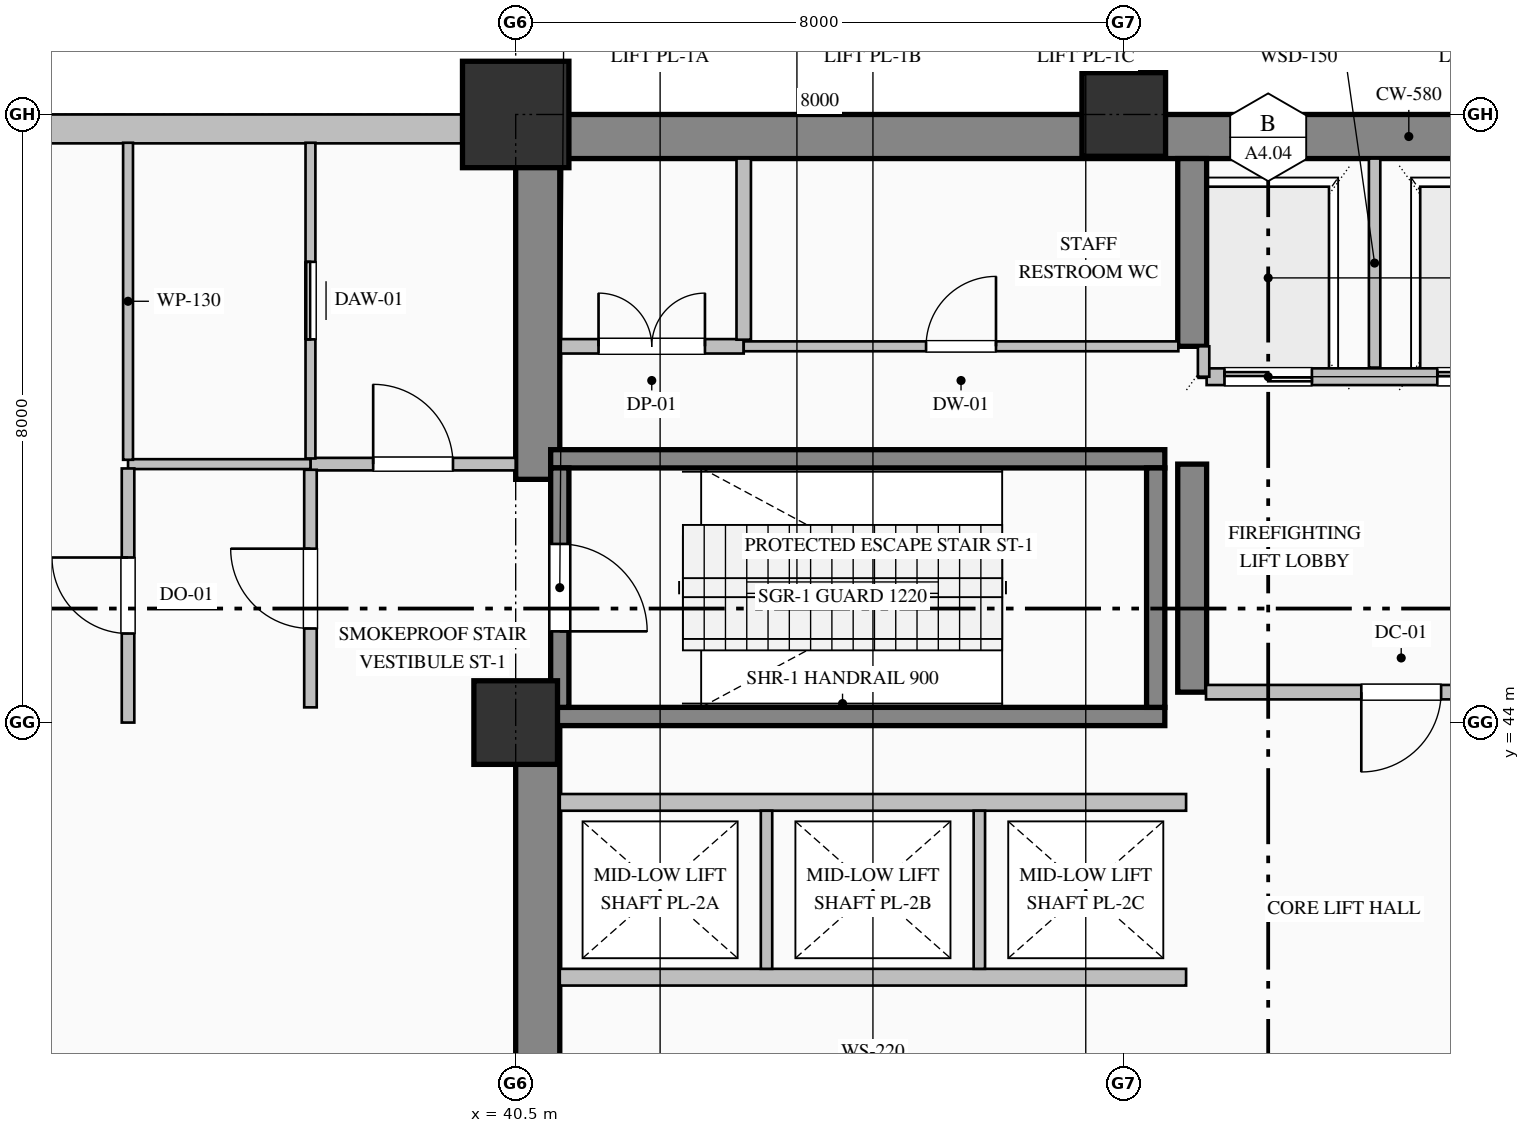
"""IFC4 building model, lengths in metres.
Left out: names, types, materials, properties, quantities, classifications, styles, units other than length and angle.
Written with IfcOpenShell. Run it as: python <this file> out.ifc"""

import sys

from ifc_helpers import new_model, si_unit, direction, frame, frame_2d, origin, origin_2d, place, context, subcontext, project, spatial, rectangle, hollow_rectangle, extrude, element, fill, save


model = new_model("IFC4")
c1 = context("Model", 3, precision=1e-05, world=origin(), true_north=direction((0.0, 1.0)))
c2 = subcontext(c1, "Body", "Model", "MODEL_VIEW")
j1 = project(units=[si_unit("LENGTHUNIT", "METRE"), si_unit("PLANEANGLEUNIT", "RADIAN")], contexts=[c1])
p1 = place(None, origin())
s1 = spatial("IfcSite", under=j1, at=p1, CompositionType="ELEMENT")
p2 = place(p1, origin())
s2 = spatial("IfcBuilding", under=s1, at=p2, CompositionType="ELEMENT")
p3 = place(p2, frame((0.0, 0.0, 11.4)))
s3 = spatial("IfcBuildingStorey", under=s2, at=p3, CompositionType="ELEMENT", Elevation=11.4)
p4 = place(p3, frame((40.5, 51.71, 0.0), z_axis=(0.0, 0.0, 1.0), x_axis=(1.0, 0.0, 0.0)))
e1 = element("IfcWall", 1, at=p4, inside=s3, PredefinedType="SHEAR", context=c2, shape_type="SweptSolid", body=[
    extrude(rectangle(XDim=23.5, YDim=0.58, at=frame_2d((11.75, 0.0))), origin(), (0.0, 0.0, 1.0), 5.55),
])
p5 = place(p3, frame((40.79, 36.58, 0.0), z_axis=(0.0, 0.0, 1.0), x_axis=(0.0, 1.0, 0.0)))
e2 = element("IfcWall", 2, at=p5, inside=s3, PredefinedType="SHEAR", context=c2, shape_type="SweptSolid", body=[
    extrude(rectangle(XDim=7.82, YDim=0.58, at=frame_2d((3.91, 0.0))), origin(), (0.0, 0.0, 1.0), 5.55),
])
p6 = place(p3, frame((40.79, 47.2, 0.0), z_axis=(0.0, 0.0, 1.0), x_axis=(0.0, 1.0, 0.0)))
e3 = element("IfcWall", 3, at=p6, inside=s3, PredefinedType="SHEAR", context=c2, shape_type="SweptSolid", body=[
    extrude(rectangle(XDim=4.22, YDim=0.58, at=frame_2d((2.11, 0.0))), origin(), (0.0, 0.0, 1.0), 5.55),
])
p7 = place(p3, frame((49.4, 44.4, 0.0), z_axis=(0.0, 0.0, 1.0), x_axis=(0.0, 1.0, 0.0)))
e4 = element("IfcWall", 4, at=p7, inside=s3, PredefinedType="SHEAR", context=c2, shape_type="SweptSolid", body=[
    extrude(rectangle(XDim=3.0, YDim=0.38, at=frame_2d((1.5, 0.0))), origin(), (0.0, 0.0, 1.0), 5.55),
])
p8 = place(p3, frame((49.4, 48.95, 0.0), z_axis=(0.0, 0.0, 1.0), x_axis=(0.0, 1.0, 0.0)))
e5 = element("IfcWall", 5, at=p8, inside=s3, PredefinedType="SHEAR", context=c2, shape_type="SweptSolid", body=[
    extrude(rectangle(XDim=2.47, YDim=0.38, at=frame_2d((1.235, 0.0))), origin(), (0.0, 0.0, 1.0), 5.55),
])
p9 = place(p3, frame((40.5, 44.0, 0.0), z_axis=(0.0, 0.0, 1.0), x_axis=(1.0, 0.0, 0.0)))
e6 = element("IfcColumn", 6, at=p9, inside=s3, PredefinedType="COLUMN", context=c2, shape_type="SweptSolid", body=[
    extrude(rectangle(XDim=1.1, YDim=1.1, at=origin_2d()), origin(), (0.0, 0.0, 1.0), 6.0),
])
p10 = place(p3, frame((40.5, 52.0, 0.0), z_axis=(0.0, 0.0, 1.0), x_axis=(1.0, 0.0, 0.0)))
e7 = element("IfcColumn", 7, at=p10, inside=s3, PredefinedType="COLUMN", context=c2, shape_type="SweptSolid", body=[
    extrude(hollow_rectangle(XDim=1.4, YDim=1.4, WallThickness=0.05, at=origin_2d()), origin(), (0.0, 0.0, 1.0), 6.0),
])
p11 = place(p3, frame((48.5, 52.0, 0.0), z_axis=(0.0, 0.0, 1.0), x_axis=(1.0, 0.0, 0.0)))
e8 = element("IfcColumn", 8, at=p11, inside=s3, PredefinedType="COLUMN", context=c2, shape_type="SweptSolid", body=[
    extrude(hollow_rectangle(XDim=1.1, YDim=1.1, WallThickness=0.04, at=origin_2d()), origin(), (0.0, 0.0, 1.0), 6.0),
])
p12 = place(p3, frame((4.0, 51.81, 0.0), z_axis=(0.0, 0.0, 1.0), x_axis=(1.0, 0.0, 0.0)))
e9 = element("IfcWall", 9, at=p12, inside=s3, PredefinedType="SOLIDWALL", context=c2, shape_type="SweptSolid", body=[
    extrude(rectangle(XDim=36.52, YDim=0.38, at=frame_2d((18.26, 0.0))), origin(), (0.0, 0.0, 1.0), 5.05),
])
p13 = place(p12, frame((16.7, 0.0, 0.85)))
e10 = element("IfcOpeningElement", 10, at=p13, cuts=e9, PredefinedType="OPENING", context=c2, shape_type="SweptSolid", body=[
    extrude(rectangle(XDim=2.6, YDim=3.1, at=frame_2d((1.3, 1.55))), frame((0.0, 0.2, 0.0), z_axis=(0.0, -1.0, 0.0), x_axis=(1.0, 0.0, 0.0)), (0.0, 0.0, 1.0), 0.4),
])
p14 = place(p12, frame((24.1, 0.0, 0.9)))
e11 = element("IfcOpeningElement", 11, at=p14, cuts=e9, PredefinedType="OPENING", context=c2, shape_type="SweptSolid", body=[
    extrude(rectangle(XDim=2.2, YDim=2.65, at=frame_2d((1.1, 1.325))), frame((0.0, 0.2, 0.0), z_axis=(0.0, -1.0, 0.0), x_axis=(1.0, 0.0, 0.0)), (0.0, 0.0, 1.0), 0.4),
])
for number, where, z_axis, x_axis in (
    (12, (40.96, 47.47, 0.0), (0.0, 0.0, 1.0), (1.0, 0.0, 0.0)),
    (13, (49.04, 44.08, 0.0), (0.0, 0.0, 1.0), (-1.0, 0.0, 0.0)),
):
    element("IfcWall", number, at=place(p3, frame(where, z_axis=z_axis, x_axis=x_axis)), inside=s3, PredefinedType="SOLIDWALL", context=c2, shape_type="SweptSolid", body=[
        extrude(rectangle(XDim=8.08, YDim=0.24, at=frame_2d((4.04, 0.0))), origin(), (0.0, 0.0, 1.0), 6.0),
    ])
p15 = place(p3, frame((41.08, 47.35, 0.0), z_axis=(0.0, 0.0, 1.0), x_axis=(0.0, -1.0, 0.0)))
e14 = element("IfcWall", 14, at=p15, inside=s3, PredefinedType="SOLIDWALL", context=c2, shape_type="SweptSolid", body=[
    extrude(rectangle(XDim=3.15, YDim=0.24, at=frame_2d((1.575, 0.0))), origin(), (0.0, 0.0, 1.0), 6.0),
])
p16 = place(p15, frame((1.0, 0.0, 0.0)))
e15 = element("IfcOpeningElement", 15, at=p16, cuts=e14, PredefinedType="OPENING", context=c2, shape_type="SweptSolid", body=[
    extrude(rectangle(XDim=1.15, YDim=2.2, at=frame_2d((0.575, 1.1))), frame((0.0, 0.13, 0.0), z_axis=(0.0, -1.0, 0.0), x_axis=(1.0, 0.0, 0.0)), (0.0, 0.0, 1.0), 0.26),
])
p17 = place(p3, frame((48.92, 44.2, 0.0), z_axis=(0.0, 0.0, 1.0), x_axis=(0.0, 1.0, 0.0)))
e16 = element("IfcWall", 16, at=p17, inside=s3, PredefinedType="SOLIDWALL", context=c2, shape_type="SweptSolid", body=[
    extrude(rectangle(XDim=3.15, YDim=0.24, at=frame_2d((1.575, 0.0))), origin(), (0.0, 0.0, 1.0), 6.0),
])
p18 = place(p3, frame((54.71, 48.55, 0.0), z_axis=(0.0, 0.0, 1.0), x_axis=(-1.0, 0.0, 0.0)))
e17 = element("IfcWall", 17, at=p18, inside=s3, PredefinedType="PARTITIONING", context=c2, shape_type="SweptSolid", body=[
    extrude(rectangle(XDim=5.12, YDim=0.22, at=frame_2d((2.56, 0.0))), origin(), (0.0, 0.0, 1.0), 5.55),
])
p19 = place(p18, frame((3.735, 0.0, 0.0)))
e18 = element("IfcOpeningElement", 18, at=p19, cuts=e17, PredefinedType="OPENING", context=c2, shape_type="SweptSolid", body=[
    extrude(rectangle(XDim=1.15, YDim=2.2, at=frame_2d((0.575, 1.1))), frame((0.0, 0.12, 0.0), z_axis=(0.0, -1.0, 0.0), x_axis=(1.0, 0.0, 0.0)), (0.0, 0.0, 1.0), 0.24),
])
p20 = place(p18, frame((0.935, 0.0, 0.0)))
e19 = element("IfcOpeningElement", 19, at=p20, cuts=e17, PredefinedType="OPENING", context=c2, shape_type="SweptSolid", body=[
    extrude(rectangle(XDim=1.15, YDim=2.2, at=frame_2d((0.575, 1.1))), frame((0.0, 0.12, 0.0), z_axis=(0.0, -1.0, 0.0), x_axis=(1.0, 0.0, 0.0)), (0.0, 0.0, 1.0), 0.24),
])
p21 = place(p3, frame((51.8, 48.67, 0.0), z_axis=(0.0, 0.0, 1.0), x_axis=(0.0, 1.0, 0.0)))
e20 = element("IfcWall", 20, at=p21, inside=s3, PredefinedType="PARTITIONING", context=c2, shape_type="SweptSolid", body=[
    extrude(rectangle(XDim=2.75, YDim=0.15, at=frame_2d((1.375, 0.0))), origin(), (0.0, 0.0, 1.0), 5.55),
])
p22 = place(p3, frame((49.55, 48.55, 0.0), z_axis=(0.0, 0.0, 1.0), x_axis=(0.0, 1.0, 0.0)))
e21 = element("IfcWall", 21, at=p22, inside=s3, PredefinedType="PARTITIONING", context=c2, shape_type="SweptSolid", body=[
    extrude(rectangle(XDim=0.4, YDim=0.15, at=frame_2d((0.2, 0.0))), origin(), (0.0, 0.0, 1.0), 5.55),
])
for number, where, z_axis, x_axis in (
    (22, (49.32, 40.65, 0.0), (0.0, 0.0, 1.0), (-1.0, 0.0, 0.0)),
    (23, (41.08, 42.95, 0.0), (0.0, 0.0, 1.0), (1.0, 0.0, 0.0)),
):
    element("IfcWall", number, at=place(p3, frame(where, z_axis=z_axis, x_axis=x_axis)), inside=s3, PredefinedType="PARTITIONING", context=c2, shape_type="SweptSolid", body=[
        extrude(rectangle(XDim=8.24, YDim=0.22, at=frame_2d((4.12, 0.0))), origin(), (0.0, 0.0, 1.0), 5.55),
    ])
for number, where, z_axis, x_axis in (
    (24, (43.8, 40.76, 0.0), (0.0, 0.0, 1.0), (0.0, 1.0, 0.0)),
    (25, (46.6, 40.76, 0.0), (0.0, 0.0, 1.0), (0.0, 1.0, 0.0)),
):
    element("IfcWall", number, at=place(p3, frame(where, z_axis=z_axis, x_axis=x_axis)), inside=s3, PredefinedType="PARTITIONING", context=c2, shape_type="SweptSolid", body=[
        extrude(rectangle(XDim=2.08, YDim=0.15, at=frame_2d((1.04, 0.0))), origin(), (0.0, 0.0, 1.0), 5.55),
    ])
p23 = place(p3, frame((37.8, 47.4, 0.0), z_axis=(0.0, 0.0, 1.0), x_axis=(1.0, 0.0, 0.0)))
e26 = element("IfcWall", 26, at=p23, inside=s3, PredefinedType="PARTITIONING", context=c2, shape_type="SweptSolid", body=[
    extrude(rectangle(XDim=2.7, YDim=0.165, at=frame_2d((1.35, 0.0))), origin(), (0.0, 0.0, 1.0), 5.55),
])
p24 = place(p23, frame((0.825, 0.0, 0.0)))
e27 = element("IfcOpeningElement", 27, at=p24, cuts=e26, PredefinedType="OPENING", context=c2, shape_type="SweptSolid", body=[
    extrude(rectangle(XDim=1.05, YDim=2.15, at=frame_2d((0.525, 1.075))), frame((0.0, 0.093, 0.0), z_axis=(0.0, -1.0, 0.0), x_axis=(1.0, 0.0, 0.0)), (0.0, 0.0, 1.0), 0.185),
])
p25 = place(p3, frame((37.8, 44.2, 0.0), z_axis=(0.0, 0.0, 1.0), x_axis=(0.0, 1.0, 0.0)))
e28 = element("IfcWall", 28, at=p25, inside=s3, PredefinedType="PARTITIONING", context=c2, shape_type="SweptSolid", body=[
    extrude(rectangle(XDim=3.125, YDim=0.165, at=frame_2d((1.563, 0.0))), origin(), (0.0, 0.0, 1.0), 5.55),
])
p26 = place(p25, frame((1.038, 0.0, 0.0)))
e29 = element("IfcOpeningElement", 29, at=p26, cuts=e28, PredefinedType="OPENING", context=c2, shape_type="SweptSolid", body=[
    extrude(rectangle(XDim=1.05, YDim=2.15, at=frame_2d((0.525, 1.075))), frame((0.0, 0.093, 0.0), z_axis=(0.0, -1.0, 0.0), x_axis=(1.0, 0.0, 0.0)), (0.0, 0.0, 1.0), 0.185),
])
p27 = place(p3, frame((37.8, 47.475, 0.0), z_axis=(0.0, 0.0, 1.0), x_axis=(0.0, 1.0, 0.0)))
e30 = element("IfcWall", 30, at=p27, inside=s3, PredefinedType="PARTITIONING", context=c2, shape_type="SweptSolid", body=[
    extrude(rectangle(XDim=4.153, YDim=0.13, at=frame_2d((2.077, 0.0))), origin(), (0.0, 0.0, 1.0), 5.55),
])
p28 = place(p27, frame((1.567, 0.0, 0.0)))
e31 = element("IfcOpeningElement", 31, at=p28, cuts=e30, PredefinedType="OPENING", context=c2, shape_type="SweptSolid", body=[
    extrude(rectangle(XDim=1.02, YDim=2.15, at=frame_2d((0.51, 1.075))), frame((0.0, 0.075, 0.0), z_axis=(0.0, -1.0, 0.0), x_axis=(1.0, 0.0, 0.0)), (0.0, 0.0, 1.0), 0.15),
])
p29 = place(p3, frame((37.8, 47.4, 0.0), z_axis=(0.0, 0.0, 1.0), x_axis=(-1.0, 0.0, 0.0)))
e32 = element("IfcWall", 32, at=p29, inside=s3, PredefinedType="PARTITIONING", context=c2, shape_type="SweptSolid", body=[
    extrude(rectangle(XDim=2.4, YDim=0.13, at=frame_2d((1.2, 0.0))), origin(), (0.0, 0.0, 1.0), 5.55),
])
p30 = place(p3, frame((35.4, 47.457, 0.0), z_axis=(0.0, 0.0, 1.0), x_axis=(0.0, 1.0, 0.0)))
e33 = element("IfcWall", 33, at=p30, inside=s3, PredefinedType="PARTITIONING", context=c2, shape_type="SweptSolid", body=[
    extrude(rectangle(XDim=4.171, YDim=0.13, at=frame_2d((2.085, 0.0))), origin(), (0.0, 0.0, 1.0), 5.55),
])
p31 = place(p3, frame((41.08, 48.95, 0.0), z_axis=(0.0, 0.0, 1.0), x_axis=(1.0, 0.0, 0.0)))
e34 = element("IfcWall", 34, at=p31, inside=s3, PredefinedType="PARTITIONING", context=c2, shape_type="SweptSolid", body=[
    extrude(rectangle(XDim=2.42, YDim=0.19, at=frame_2d((1.21, 0.0))), origin(), (0.0, 0.0, 1.0), 5.55),
])
p32 = place(p31, frame((0.51, 0.0, 0.0)))
e35 = element("IfcOpeningElement", 35, at=p32, cuts=e34, PredefinedType="OPENING", context=c2, shape_type="SweptSolid", body=[
    extrude(rectangle(XDim=1.4, YDim=2.25, at=frame_2d((0.7, 1.125))), frame((0.0, 0.105, 0.0), z_axis=(0.0, -1.0, 0.0), x_axis=(1.0, 0.0, 0.0)), (0.0, 0.0, 1.0), 0.21),
])
p33 = place(p3, frame((43.5, 48.95, 0.0), z_axis=(0.0, 0.0, 1.0), x_axis=(1.0, 0.0, 0.0)))
e36 = element("IfcWall", 36, at=p33, inside=s3, PredefinedType="PARTITIONING", context=c2, shape_type="SweptSolid", body=[
    extrude(rectangle(XDim=5.718, YDim=0.13, at=frame_2d((2.859, 0.0))), origin(), (0.0, 0.0, 1.0), 5.55),
])
p34 = place(p33, frame((2.399, 0.0, 0.0)))
e37 = element("IfcOpeningElement", 37, at=p34, cuts=e36, PredefinedType="OPENING", context=c2, shape_type="SweptSolid", body=[
    extrude(rectangle(XDim=0.92, YDim=2.15, at=frame_2d((0.46, 1.075))), frame((0.0, 0.075, 0.0), z_axis=(0.0, -1.0, 0.0), x_axis=(1.0, 0.0, 0.0)), (0.0, 0.0, 1.0), 0.15),
])
p35 = place(p3, frame((54.718, 44.4, 0.0), z_axis=(0.0, 0.0, 1.0), x_axis=(-1.0, 0.0, 0.0)))
e38 = element("IfcWall", 38, at=p35, inside=s3, PredefinedType="PARTITIONING", context=c2, shape_type="SweptSolid", body=[
    extrude(rectangle(XDim=5.136, YDim=0.19, at=frame_2d((2.568, 0.0))), origin(), (0.0, 0.0, 1.0), 5.55),
])
p36 = place(p35, frame((2.043, 0.0, 0.0)))
e39 = element("IfcOpeningElement", 39, at=p36, cuts=e38, PredefinedType="OPENING", context=c2, shape_type="SweptSolid", body=[
    extrude(rectangle(XDim=1.05, YDim=2.15, at=frame_2d((0.525, 1.075))), frame((0.0, 0.105, 0.0), z_axis=(0.0, -1.0, 0.0), x_axis=(1.0, 0.0, 0.0)), (0.0, 0.0, 1.0), 0.21),
])
p37 = place(p3, frame((43.5, 51.42, 0.0), z_axis=(0.0, 0.0, 1.0), x_axis=(0.0, -1.0, 0.0)))
e40 = element("IfcWall", 40, at=p37, inside=s3, PredefinedType="PARTITIONING", context=c2, shape_type="SweptSolid", body=[
    extrude(rectangle(XDim=2.383, YDim=0.19, at=frame_2d((1.191, 0.0))), origin(), (0.0, 0.0, 1.0), 5.55),
])
p38 = place(p3, frame((35.4, 44.0, 0.0), z_axis=(0.0, 0.0, 1.0), x_axis=(0.0, 1.0, 0.0)))
e41 = element("IfcWall", 41, at=p38, inside=s3, PredefinedType="PARTITIONING", context=c2, shape_type="SweptSolid", body=[
    extrude(rectangle(XDim=3.343, YDim=0.165, at=frame_2d((1.671, 0.0))), origin(), (0.0, 0.0, 1.0), 5.55),
])
p39 = place(p38, frame((1.171, 0.0, 0.0)))
e42 = element("IfcOpeningElement", 42, at=p39, cuts=e41, PredefinedType="OPENING", context=c2, shape_type="SweptSolid", body=[
    extrude(rectangle(XDim=1.0, YDim=2.15, at=frame_2d((0.5, 1.075))), frame((0.0, 0.093, 0.0), z_axis=(0.0, -1.0, 0.0), x_axis=(1.0, 0.0, 0.0)), (0.0, 0.0, 1.0), 0.185),
])
p40 = place(p16, origin())
e43 = element("IfcDoor", 43, at=p40, inside=s3, OperationType="SINGLE_SWING_RIGHT", PredefinedType="DOOR", context=c2, shape_type="SweptSolid", body=[
    extrude(rectangle(XDim=1.15, YDim=2.2, at=frame_2d((0.575, 1.1))), frame((0.0, 0.025, 0.0), z_axis=(0.0, -1.0, 0.0), x_axis=(1.0, 0.0, 0.0)), (0.0, 0.0, 1.0), 0.05),
])
fill(e15, e43)
p41 = place(p19, origin())
e44 = element("IfcDoor", 44, at=p41, inside=s3, OperationType="DOUBLE_DOOR_SLIDING", PredefinedType="DOOR", context=c2, shape_type="SweptSolid", body=[
    extrude(rectangle(XDim=1.15, YDim=2.2, at=frame_2d((0.575, 1.1))), frame((0.0, 0.025, 0.0), z_axis=(0.0, -1.0, 0.0), x_axis=(1.0, 0.0, 0.0)), (0.0, 0.0, 1.0), 0.05),
])
fill(e18, e44)
p42 = place(p20, origin())
e45 = element("IfcDoor", 45, at=p42, inside=s3, OperationType="DOUBLE_DOOR_SLIDING", PredefinedType="DOOR", context=c2, shape_type="SweptSolid", body=[
    extrude(rectangle(XDim=1.15, YDim=2.2, at=frame_2d((0.575, 1.1))), frame((0.0, 0.025, 0.0), z_axis=(0.0, -1.0, 0.0), x_axis=(1.0, 0.0, 0.0)), (0.0, 0.0, 1.0), 0.05),
])
fill(e19, e45)
p43 = place(p36, origin())
e46 = element("IfcDoor", 46, at=p43, inside=s3, OperationType="SINGLE_SWING_RIGHT", PredefinedType="DOOR", context=c2, shape_type="SweptSolid", body=[
    extrude(rectangle(XDim=1.05, YDim=2.15, at=frame_2d((0.525, 1.075))), frame((0.0, 0.025, 0.0), z_axis=(0.0, -1.0, 0.0), x_axis=(1.0, 0.0, 0.0)), (0.0, 0.0, 1.0), 0.05),
])
fill(e39, e46)
p44 = place(p26, origin())
e47 = element("IfcDoor", 47, at=p44, inside=s3, OperationType="SINGLE_SWING_RIGHT", PredefinedType="DOOR", context=c2, shape_type="SweptSolid", body=[
    extrude(rectangle(XDim=1.05, YDim=2.15, at=frame_2d((0.525, 1.075))), frame((0.0, 0.025, 0.0), z_axis=(0.0, -1.0, 0.0), x_axis=(1.0, 0.0, 0.0)), (0.0, 0.0, 1.0), 0.05),
])
fill(e29, e47)
p45 = place(p24, origin())
e48 = element("IfcDoor", 48, at=p45, inside=s3, OperationType="SINGLE_SWING_LEFT", PredefinedType="DOOR", context=c2, shape_type="SweptSolid", body=[
    extrude(rectangle(XDim=1.05, YDim=2.15, at=frame_2d((0.525, 1.075))), frame((0.0, 0.025, 0.0), z_axis=(0.0, -1.0, 0.0), x_axis=(1.0, 0.0, 0.0)), (0.0, 0.0, 1.0), 0.05),
])
fill(e27, e48)
p46 = place(p28, origin())
e49 = element("IfcDoor", 49, at=p46, inside=s3, OperationType="SLIDING_TO_LEFT", PredefinedType="DOOR", context=c2, shape_type="SweptSolid", body=[
    extrude(rectangle(XDim=1.02, YDim=2.15, at=frame_2d((0.51, 1.075))), frame((0.0, 0.025, 0.0), z_axis=(0.0, -1.0, 0.0), x_axis=(1.0, 0.0, 0.0)), (0.0, 0.0, 1.0), 0.05),
])
fill(e31, e49)
p47 = place(p32, origin())
e50 = element("IfcDoor", 50, at=p47, inside=s3, OperationType="DOUBLE_DOOR_SINGLE_SWING", PredefinedType="DOOR", context=c2, shape_type="SweptSolid", body=[
    extrude(rectangle(XDim=1.4, YDim=2.25, at=frame_2d((0.7, 1.125))), frame((0.0, 0.025, 0.0), z_axis=(0.0, -1.0, 0.0), x_axis=(1.0, 0.0, 0.0)), (0.0, 0.0, 1.0), 0.05),
])
fill(e35, e50)
p48 = place(p34, origin())
e51 = element("IfcDoor", 51, at=p48, inside=s3, OperationType="SINGLE_SWING_RIGHT", PredefinedType="DOOR", context=c2, shape_type="SweptSolid", body=[
    extrude(rectangle(XDim=0.92, YDim=2.15, at=frame_2d((0.46, 1.075))), frame((0.0, 0.025, 0.0), z_axis=(0.0, -1.0, 0.0), x_axis=(1.0, 0.0, 0.0)), (0.0, 0.0, 1.0), 0.05),
])
fill(e37, e51)
p49 = place(p39, origin())
e52 = element("IfcDoor", 52, at=p49, inside=s3, OperationType="SINGLE_SWING_RIGHT", PredefinedType="DOOR", context=c2, shape_type="SweptSolid", body=[
    extrude(rectangle(XDim=1.0, YDim=2.15, at=frame_2d((0.5, 1.075))), frame((0.0, 0.025, 0.0), z_axis=(0.0, -1.0, 0.0), x_axis=(1.0, 0.0, 0.0)), (0.0, 0.0, 1.0), 0.05),
])
fill(e42, e52)
save(model, sys.argv[1])
